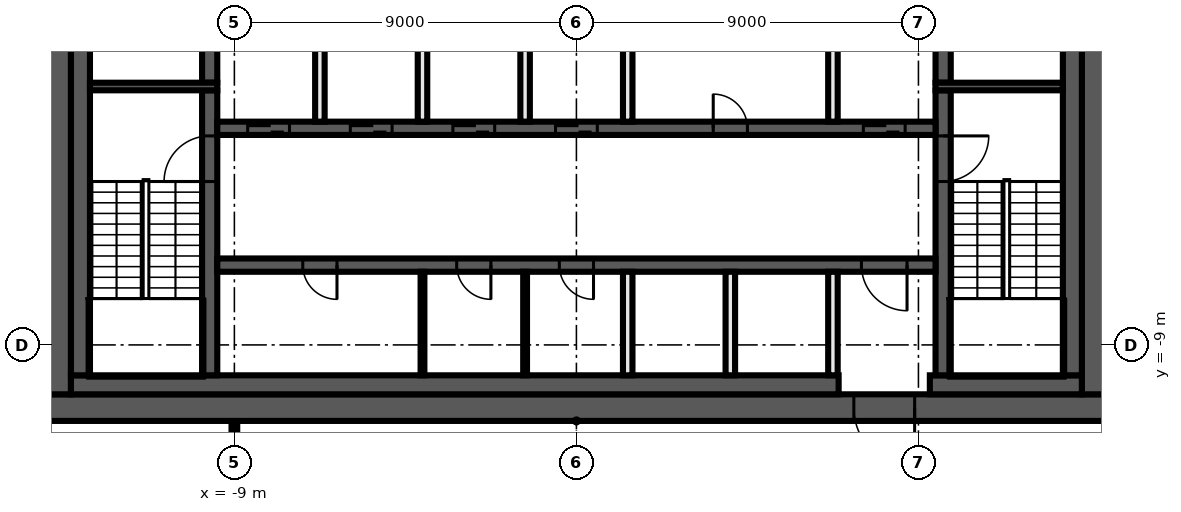
"""IFC4 building model, lengths in metres.
Left out: names, types, materials, properties, quantities, classifications, styles, units other than length and angle.
Written with IfcOpenShell. Run it as: python <this file> out.ifc"""

import sys

from ifc_helpers import new_model, si_unit, direction, frame, frame_2d, origin, place, context, subcontext, project, spatial, rectangle, extrude, element, fill, save


model = new_model("IFC4")
c1 = context("Model", 3, precision=1e-05, world=origin(), true_north=direction((0.0, 1.0)))
c2 = subcontext(c1, "Body", "Model", "MODEL_VIEW")
j1 = project(units=[si_unit("LENGTHUNIT", "METRE"), si_unit("PLANEANGLEUNIT", "RADIAN")], contexts=[c1])
p1 = place(None, origin())
s1 = spatial("IfcSite", under=j1, at=p1, CompositionType="ELEMENT")
p2 = place(p1, origin())
s2 = spatial("IfcBuilding", under=s1, at=p2, CompositionType="ELEMENT")
p3 = place(p2, frame((0.0, 0.0, 241.2)))
s3 = spatial("IfcBuildingStorey", under=s2, at=p3, CompositionType="ELEMENT", Elevation=241.2)
p4 = place(p3, frame((-9.0, -13.925, 0.0), z_axis=(0.0, 0.0, 1.0), x_axis=(0.0, 1.0, 0.0)))
e1 = element("IfcWall", 1, at=p4, inside=s3, PredefinedType="PARTITIONING", context=c2, shape_type="SweptSolid", body=[
    extrude(rectangle(XDim=2.925, YDim=0.15, at=frame_2d((1.462, 0.0))), origin(), (0.0, 0.0, 1.0), 3.82),
])
p5 = place(p3, frame((14.0, -10.65, 0.0), z_axis=(0.0, 0.0, 1.0), x_axis=(-1.0, 0.0, 0.0)))
e2 = element("IfcWall", 2, at=p5, inside=s3, PredefinedType="SHEAR", context=c2, shape_type="SweptSolid", body=[
    extrude(rectangle(XDim=28.0, YDim=0.7, at=frame_2d((14.0, 0.0))), origin(), (0.0, 0.0, 1.0), 3.82),
])
p6 = place(p5, frame((5.1, 0.0, 0.0)))
e3 = element("IfcOpeningElement", 3, at=p6, cuts=e2, PredefinedType="OPENING", context=c2, shape_type="SweptSolid", body=[
    extrude(rectangle(XDim=1.6, YDim=2.1, at=frame_2d((0.8, 1.05))), frame((0.0, 0.36, 0.0), z_axis=(0.0, -1.0, 0.0), x_axis=(1.0, 0.0, 0.0)), (0.0, 0.0, 1.0), 0.72),
])
for number, where, z_axis, x_axis in (
    (4, (13.65, 10.3, 0.0), (0.0, 0.0, 1.0), (0.0, -1.0, 0.0)),
    (5, (-13.65, -10.3, 0.0), (0.0, 0.0, 1.0), (0.0, 1.0, 0.0)),
):
    element("IfcWall", number, at=place(p3, frame(where, z_axis=z_axis, x_axis=x_axis)), inside=s3, PredefinedType="SHEAR", context=c2, shape_type="SweptSolid", body=[
        extrude(rectangle(XDim=20.6, YDim=0.7, at=frame_2d((10.3, 0.0))), origin(), (0.0, 0.0, 1.0), 3.82),
    ])
p7 = place(p3, frame((13.3, -10.05, 0.0), z_axis=(0.0, 0.0, 1.0), x_axis=(-1.0, 0.0, 0.0)))
e6 = element("IfcWall", 6, at=p7, inside=s3, PredefinedType="SHEAR", context=c2, shape_type="SweptSolid", body=[
    extrude(rectangle(XDim=4.0, YDim=0.5, at=frame_2d((2.0, 0.0))), origin(), (0.0, 0.0, 1.0), 3.82),
])
p8 = place(p3, frame((6.9, -10.05, 0.0), z_axis=(0.0, 0.0, 1.0), x_axis=(-1.0, 0.0, 0.0)))
e7 = element("IfcWall", 7, at=p8, inside=s3, PredefinedType="SHEAR", context=c2, shape_type="SweptSolid", body=[
    extrude(rectangle(XDim=20.2, YDim=0.5, at=frame_2d((10.1, 0.0))), origin(), (0.0, 0.0, 1.0), 3.82),
])
for number, where, z_axis, x_axis in (
    (8, (13.05, 9.8, 0.0), (0.0, 0.0, 1.0), (0.0, -1.0, 0.0)),
    (9, (-13.05, -9.8, 0.0), (0.0, 0.0, 1.0), (0.0, 1.0, 0.0)),
):
    element("IfcWall", number, at=place(p3, frame(where, z_axis=z_axis, x_axis=x_axis)), inside=s3, PredefinedType="SHEAR", context=c2, shape_type="SweptSolid", body=[
        extrude(rectangle(XDim=19.6, YDim=0.5, at=frame_2d((9.8, 0.0))), origin(), (0.0, 0.0, 1.0), 3.82),
    ])
p9 = place(p3, frame((9.65, -2.3, 0.0), z_axis=(0.0, 0.0, 1.0), x_axis=(0.0, -1.0, 0.0)))
e10 = element("IfcWall", 10, at=p9, inside=s3, PredefinedType="SHEAR", context=c2, shape_type="SweptSolid", body=[
    extrude(rectangle(XDim=7.5, YDim=0.4, at=frame_2d((3.75, 0.0))), origin(), (0.0, 0.0, 1.0), 3.82),
])
p10 = place(p9, frame((1.2, 0.0, 0.0)))
e11 = element("IfcOpeningElement", 11, at=p10, cuts=e10, PredefinedType="OPENING", context=c2, shape_type="SweptSolid", body=[
    extrude(rectangle(XDim=1.2, YDim=2.1, at=frame_2d((0.6, 1.05))), frame((0.0, 0.21, 0.0), z_axis=(0.0, -1.0, 0.0), x_axis=(1.0, 0.0, 0.0)), (0.0, 0.0, 1.0), 0.42),
])
p11 = place(p3, frame((9.65, 2.1, 0.0), z_axis=(0.0, 0.0, 1.0), x_axis=(0.0, -1.0, 0.0)))
e12 = element("IfcWall", 12, at=p11, inside=s3, PredefinedType="SHEAR", context=c2, shape_type="SweptSolid", body=[
    extrude(rectangle(XDim=4.2, YDim=0.4, at=frame_2d((2.1, 0.0))), origin(), (0.0, 0.0, 1.0), 3.82),
])
p12 = place(p11, frame((0.15, 0.0, 0.0)))
e13 = element("IfcOpeningElement", 13, at=p12, cuts=e12, PredefinedType="OPENING", context=c2, shape_type="SweptSolid", body=[
    extrude(rectangle(XDim=0.9, YDim=2.1, at=frame_2d((0.45, 1.05))), frame((0.0, 0.21, 0.0), z_axis=(0.0, -1.0, 0.0), x_axis=(1.0, 0.0, 0.0)), (0.0, 0.0, 1.0), 0.42),
])
p13 = place(p3, frame((-9.65, -9.8, 0.0), z_axis=(0.0, 0.0, 1.0), x_axis=(0.0, 1.0, 0.0)))
e14 = element("IfcWall", 14, at=p13, inside=s3, PredefinedType="SHEAR", context=c2, shape_type="SweptSolid", body=[
    extrude(rectangle(XDim=7.5, YDim=0.4, at=frame_2d((3.75, 0.0))), origin(), (0.0, 0.0, 1.0), 3.82),
])
p14 = place(p13, frame((5.1, 0.0, 0.0)))
e15 = element("IfcOpeningElement", 15, at=p14, cuts=e14, PredefinedType="OPENING", context=c2, shape_type="SweptSolid", body=[
    extrude(rectangle(XDim=1.2, YDim=2.1, at=frame_2d((0.6, 1.05))), frame((0.0, 0.21, 0.0), z_axis=(0.0, -1.0, 0.0), x_axis=(1.0, 0.0, 0.0)), (0.0, 0.0, 1.0), 0.42),
])
p15 = place(p3, frame((-9.65, -2.1, 0.0), z_axis=(0.0, 0.0, 1.0), x_axis=(0.0, 1.0, 0.0)))
e16 = element("IfcWall", 16, at=p15, inside=s3, PredefinedType="SHEAR", context=c2, shape_type="SweptSolid", body=[
    extrude(rectangle(XDim=4.2, YDim=0.4, at=frame_2d((2.1, 0.0))), origin(), (0.0, 0.0, 1.0), 3.82),
])
for number, where, z_axis, x_axis in (
    (17, (9.45, -2.2, 0.0), (0.0, 0.0, 1.0), (1.0, 0.0, 0.0)),
    (18, (-9.45, -2.2, 0.0), (0.0, 0.0, 1.0), (-1.0, 0.0, 0.0)),
):
    element("IfcWall", number, at=place(p3, frame(where, z_axis=z_axis, x_axis=x_axis)), inside=s3, PredefinedType="SHEAR", context=c2, shape_type="SweptSolid", body=[
        extrude(rectangle(XDim=3.35, YDim=0.2, at=frame_2d((1.675, 0.0))), origin(), (0.0, 0.0, 1.0), 3.82),
    ])
p16 = place(p3, frame((-9.45, -3.3, 0.0), z_axis=(0.0, 0.0, 1.0), x_axis=(1.0, 0.0, 0.0)))
e19 = element("IfcWall", 19, at=p16, inside=s3, PredefinedType="SHEAR", context=c2, shape_type="SweptSolid", body=[
    extrude(rectangle(XDim=18.9, YDim=0.35, at=frame_2d((9.45, 0.0))), origin(), (0.0, 0.0, 1.0), 3.82),
])
p17 = place(p16, frame((0.8, 0.0, 0.0)))
e20 = element("IfcOpeningElement", 20, at=p17, cuts=e19, PredefinedType="OPENING", context=c2, shape_type="SweptSolid", body=[
    extrude(rectangle(XDim=1.1, YDim=2.1, at=frame_2d((0.55, 1.05))), frame((0.0, 0.185, 0.0), z_axis=(0.0, -1.0, 0.0), x_axis=(1.0, 0.0, 0.0)), (0.0, 0.0, 1.0), 0.37),
])
p18 = place(p16, frame((3.5, 0.0, 0.0)))
e21 = element("IfcOpeningElement", 21, at=p18, cuts=e19, PredefinedType="OPENING", context=c2, shape_type="SweptSolid", body=[
    extrude(rectangle(XDim=1.1, YDim=2.1, at=frame_2d((0.55, 1.05))), frame((0.0, 0.185, 0.0), z_axis=(0.0, -1.0, 0.0), x_axis=(1.0, 0.0, 0.0)), (0.0, 0.0, 1.0), 0.37),
])
p19 = place(p16, frame((6.2, 0.0, 0.0)))
e22 = element("IfcOpeningElement", 22, at=p19, cuts=e19, PredefinedType="OPENING", context=c2, shape_type="SweptSolid", body=[
    extrude(rectangle(XDim=1.1, YDim=2.1, at=frame_2d((0.55, 1.05))), frame((0.0, 0.185, 0.0), z_axis=(0.0, -1.0, 0.0), x_axis=(1.0, 0.0, 0.0)), (0.0, 0.0, 1.0), 0.37),
])
p20 = place(p16, frame((8.9, 0.0, 0.0)))
e23 = element("IfcOpeningElement", 23, at=p20, cuts=e19, PredefinedType="OPENING", context=c2, shape_type="SweptSolid", body=[
    extrude(rectangle(XDim=1.1, YDim=2.1, at=frame_2d((0.55, 1.05))), frame((0.0, 0.185, 0.0), z_axis=(0.0, -1.0, 0.0), x_axis=(1.0, 0.0, 0.0)), (0.0, 0.0, 1.0), 0.37),
])
p21 = place(p16, frame((17.0, 0.0, 0.0)))
e24 = element("IfcOpeningElement", 24, at=p21, cuts=e19, PredefinedType="OPENING", context=c2, shape_type="SweptSolid", body=[
    extrude(rectangle(XDim=1.1, YDim=2.1, at=frame_2d((0.55, 1.05))), frame((0.0, 0.185, 0.0), z_axis=(0.0, -1.0, 0.0), x_axis=(1.0, 0.0, 0.0)), (0.0, 0.0, 1.0), 0.37),
])
p22 = place(p16, frame((13.05, 0.0, 0.0)))
e25 = element("IfcOpeningElement", 25, at=p22, cuts=e19, PredefinedType="OPENING", context=c2, shape_type="SweptSolid", body=[
    extrude(rectangle(XDim=0.9, YDim=2.1, at=frame_2d((0.45, 1.05))), frame((0.0, 0.185, 0.0), z_axis=(0.0, -1.0, 0.0), x_axis=(1.0, 0.0, 0.0)), (0.0, 0.0, 1.0), 0.37),
])
p23 = place(p3, frame((9.45, -6.9, 0.0), z_axis=(0.0, 0.0, 1.0), x_axis=(-1.0, 0.0, 0.0)))
e26 = element("IfcWall", 26, at=p23, inside=s3, PredefinedType="SHEAR", context=c2, shape_type="SweptSolid", body=[
    extrude(rectangle(XDim=18.9, YDim=0.35, at=frame_2d((9.45, 0.0))), origin(), (0.0, 0.0, 1.0), 3.82),
])
p24 = place(p23, frame((0.75, 0.0, 0.0)))
e27 = element("IfcOpeningElement", 27, at=p24, cuts=e26, PredefinedType="OPENING", context=c2, shape_type="SweptSolid", body=[
    extrude(rectangle(XDim=1.2, YDim=2.1, at=frame_2d((0.6, 1.05))), frame((0.0, 0.185, 0.0), z_axis=(0.0, -1.0, 0.0), x_axis=(1.0, 0.0, 0.0)), (0.0, 0.0, 1.0), 0.37),
])
p25 = place(p23, frame((15.75, 0.0, 0.0)))
e28 = element("IfcOpeningElement", 28, at=p25, cuts=e26, PredefinedType="OPENING", context=c2, shape_type="SweptSolid", body=[
    extrude(rectangle(XDim=0.9, YDim=2.1, at=frame_2d((0.45, 1.05))), frame((0.0, 0.185, 0.0), z_axis=(0.0, -1.0, 0.0), x_axis=(1.0, 0.0, 0.0)), (0.0, 0.0, 1.0), 0.37),
])
p26 = place(p23, frame((11.7, 0.0, 0.0)))
e29 = element("IfcOpeningElement", 29, at=p26, cuts=e26, PredefinedType="OPENING", context=c2, shape_type="SweptSolid", body=[
    extrude(rectangle(XDim=0.9, YDim=2.1, at=frame_2d((0.45, 1.05))), frame((0.0, 0.185, 0.0), z_axis=(0.0, -1.0, 0.0), x_axis=(1.0, 0.0, 0.0)), (0.0, 0.0, 1.0), 0.37),
])
p27 = place(p23, frame((9.0, 0.0, 0.0)))
e30 = element("IfcOpeningElement", 30, at=p27, cuts=e26, PredefinedType="OPENING", context=c2, shape_type="SweptSolid", body=[
    extrude(rectangle(XDim=0.9, YDim=2.1, at=frame_2d((0.45, 1.05))), frame((0.0, 0.185, 0.0), z_axis=(0.0, -1.0, 0.0), x_axis=(1.0, 0.0, 0.0)), (0.0, 0.0, 1.0), 0.37),
])
for number, where, z_axis, x_axis in (
    (31, (6.75, -9.8, 0.0), (0.0, 0.0, 1.0), (0.0, 1.0, 0.0)),
    (32, (6.75, -3.125, 0.0), (0.0, 0.0, 1.0), (0.0, 1.0, 0.0)),
    (33, (4.05, -9.8, 0.0), (0.0, 0.0, 1.0), (0.0, 1.0, 0.0)),
    (34, (1.35, -9.8, 0.0), (0.0, 0.0, 1.0), (0.0, 1.0, 0.0)),
    (35, (1.35, -3.125, 0.0), (0.0, 0.0, 1.0), (0.0, 1.0, 0.0)),
):
    element("IfcWall", number, at=place(p3, frame(where, z_axis=z_axis, x_axis=x_axis)), inside=s3, PredefinedType="SOLIDWALL", context=c2, shape_type="SweptSolid", body=[
        extrude(rectangle(XDim=2.725, YDim=0.25, at=frame_2d((1.363, 0.0))), origin(), (0.0, 0.0, 1.0), 3.82),
    ])
p28 = place(p3, frame((-1.35, -9.8, 0.0), z_axis=(0.0, 0.0, 1.0), x_axis=(0.0, 1.0, 0.0)))
e36 = element("IfcWall", 36, at=p28, inside=s3, PredefinedType="PARTITIONING", context=c2, shape_type="SweptSolid", body=[
    extrude(rectangle(XDim=2.725, YDim=0.1, at=frame_2d((1.363, 0.0))), origin(), (0.0, 0.0, 1.0), 3.82),
])
p29 = place(p3, frame((-1.35, -3.125, 0.0), z_axis=(0.0, 0.0, 1.0), x_axis=(0.0, 1.0, 0.0)))
e37 = element("IfcWall", 37, at=p29, inside=s3, PredefinedType="SOLIDWALL", context=c2, shape_type="SweptSolid", body=[
    extrude(rectangle(XDim=2.725, YDim=0.25, at=frame_2d((1.363, 0.0))), origin(), (0.0, 0.0, 1.0), 3.82),
])
p30 = place(p3, frame((-4.05, -9.8, 0.0), z_axis=(0.0, 0.0, 1.0), x_axis=(0.0, 1.0, 0.0)))
e38 = element("IfcWall", 38, at=p30, inside=s3, PredefinedType="PARTITIONING", context=c2, shape_type="SweptSolid", body=[
    extrude(rectangle(XDim=2.725, YDim=0.1, at=frame_2d((1.363, 0.0))), origin(), (0.0, 0.0, 1.0), 3.82),
])
for number, where, z_axis, x_axis in (
    (39, (-4.05, -3.125, 0.0), (0.0, 0.0, 1.0), (0.0, 1.0, 0.0)),
    (40, (-6.75, -3.125, 0.0), (0.0, 0.0, 1.0), (0.0, 1.0, 0.0)),
):
    element("IfcWall", number, at=place(p3, frame(where, z_axis=z_axis, x_axis=x_axis)), inside=s3, PredefinedType="SOLIDWALL", context=c2, shape_type="SweptSolid", body=[
        extrude(rectangle(XDim=2.725, YDim=0.25, at=frame_2d((1.363, 0.0))), origin(), (0.0, 0.0, 1.0), 3.82),
    ])
p31 = place(p17, origin())
e41 = element("IfcDoor", 41, at=p31, inside=s3, OperationType="DOUBLE_DOOR_SLIDING", PredefinedType="DOOR", context=c2, shape_type="SweptSolid", body=[
    extrude(rectangle(XDim=1.1, YDim=2.1, at=frame_2d((0.55, 1.05))), frame((0.0, 0.025, 0.0), z_axis=(0.0, -1.0, 0.0), x_axis=(1.0, 0.0, 0.0)), (0.0, 0.0, 1.0), 0.05),
])
fill(e20, e41)
p32 = place(p18, origin())
e42 = element("IfcDoor", 42, at=p32, inside=s3, OperationType="DOUBLE_DOOR_SLIDING", PredefinedType="DOOR", context=c2, shape_type="SweptSolid", body=[
    extrude(rectangle(XDim=1.1, YDim=2.1, at=frame_2d((0.55, 1.05))), frame((0.0, 0.025, 0.0), z_axis=(0.0, -1.0, 0.0), x_axis=(1.0, 0.0, 0.0)), (0.0, 0.0, 1.0), 0.05),
])
fill(e21, e42)
p33 = place(p19, origin())
e43 = element("IfcDoor", 43, at=p33, inside=s3, OperationType="DOUBLE_DOOR_SLIDING", PredefinedType="DOOR", context=c2, shape_type="SweptSolid", body=[
    extrude(rectangle(XDim=1.1, YDim=2.1, at=frame_2d((0.55, 1.05))), frame((0.0, 0.025, 0.0), z_axis=(0.0, -1.0, 0.0), x_axis=(1.0, 0.0, 0.0)), (0.0, 0.0, 1.0), 0.05),
])
fill(e22, e43)
p34 = place(p20, origin())
e44 = element("IfcDoor", 44, at=p34, inside=s3, OperationType="DOUBLE_DOOR_SLIDING", PredefinedType="DOOR", context=c2, shape_type="SweptSolid", body=[
    extrude(rectangle(XDim=1.1, YDim=2.1, at=frame_2d((0.55, 1.05))), frame((0.0, 0.025, 0.0), z_axis=(0.0, -1.0, 0.0), x_axis=(1.0, 0.0, 0.0)), (0.0, 0.0, 1.0), 0.05),
])
fill(e23, e44)
p35 = place(p21, origin())
e45 = element("IfcDoor", 45, at=p35, inside=s3, OperationType="DOUBLE_DOOR_SLIDING", PredefinedType="DOOR", context=c2, shape_type="SweptSolid", body=[
    extrude(rectangle(XDim=1.1, YDim=2.1, at=frame_2d((0.55, 1.05))), frame((0.0, 0.025, 0.0), z_axis=(0.0, -1.0, 0.0), x_axis=(1.0, 0.0, 0.0)), (0.0, 0.0, 1.0), 0.05),
])
fill(e24, e45)
p36 = place(p6, origin())
e46 = element("IfcDoor", 46, at=p36, inside=s3, OperationType="DOUBLE_DOOR_SINGLE_SWING", PredefinedType="DOOR", context=c2, shape_type="SweptSolid", body=[
    extrude(rectangle(XDim=1.6, YDim=2.1, at=frame_2d((0.8, 1.05))), frame((0.0, 0.025, 0.0), z_axis=(0.0, -1.0, 0.0), x_axis=(1.0, 0.0, 0.0)), (0.0, 0.0, 1.0), 0.05),
])
fill(e3, e46)
p37 = place(p24, origin())
e47 = element("IfcDoor", 47, at=p37, inside=s3, OperationType="SINGLE_SWING_LEFT", PredefinedType="DOOR", context=c2, shape_type="SweptSolid", body=[
    extrude(rectangle(XDim=1.2, YDim=2.1, at=frame_2d((0.6, 1.05))), frame((0.0, 0.025, 0.0), z_axis=(0.0, -1.0, 0.0), x_axis=(1.0, 0.0, 0.0)), (0.0, 0.0, 1.0), 0.05),
])
fill(e27, e47)
p38 = place(p22, origin())
e48 = element("IfcDoor", 48, at=p38, inside=s3, OperationType="SINGLE_SWING_RIGHT", PredefinedType="DOOR", context=c2, shape_type="SweptSolid", body=[
    extrude(rectangle(XDim=0.9, YDim=2.1, at=frame_2d((0.45, 1.05))), frame((0.0, 0.025, 0.0), z_axis=(0.0, -1.0, 0.0), x_axis=(1.0, 0.0, 0.0)), (0.0, 0.0, 1.0), 0.05),
])
fill(e25, e48)
p39 = place(p25, origin())
e49 = element("IfcDoor", 49, at=p39, inside=s3, OperationType="SINGLE_SWING_LEFT", PredefinedType="DOOR", context=c2, shape_type="SweptSolid", body=[
    extrude(rectangle(XDim=0.9, YDim=2.1, at=frame_2d((0.45, 1.05))), frame((0.0, 0.025, 0.0), z_axis=(0.0, -1.0, 0.0), x_axis=(1.0, 0.0, 0.0)), (0.0, 0.0, 1.0), 0.05),
])
fill(e28, e49)
p40 = place(p26, origin())
e50 = element("IfcDoor", 50, at=p40, inside=s3, OperationType="SINGLE_SWING_RIGHT", PredefinedType="DOOR", context=c2, shape_type="SweptSolid", body=[
    extrude(rectangle(XDim=0.9, YDim=2.1, at=frame_2d((0.45, 1.05))), frame((0.0, 0.025, 0.0), z_axis=(0.0, -1.0, 0.0), x_axis=(1.0, 0.0, 0.0)), (0.0, 0.0, 1.0), 0.05),
])
fill(e29, e50)
p41 = place(p27, origin())
e51 = element("IfcDoor", 51, at=p41, inside=s3, OperationType="SINGLE_SWING_LEFT", PredefinedType="DOOR", context=c2, shape_type="SweptSolid", body=[
    extrude(rectangle(XDim=0.9, YDim=2.1, at=frame_2d((0.45, 1.05))), frame((0.0, 0.025, 0.0), z_axis=(0.0, -1.0, 0.0), x_axis=(1.0, 0.0, 0.0)), (0.0, 0.0, 1.0), 0.05),
])
fill(e30, e51)
p42 = place(p10, origin())
e52 = element("IfcDoor", 52, at=p42, inside=s3, OperationType="SINGLE_SWING_RIGHT", PredefinedType="DOOR", context=c2, shape_type="SweptSolid", body=[
    extrude(rectangle(XDim=1.2, YDim=2.1, at=frame_2d((0.6, 1.05))), frame((0.0, 0.025, 0.0), z_axis=(0.0, -1.0, 0.0), x_axis=(1.0, 0.0, 0.0)), (0.0, 0.0, 1.0), 0.05),
])
fill(e11, e52)
p43 = place(p14, origin())
e53 = element("IfcDoor", 53, at=p43, inside=s3, OperationType="SINGLE_SWING_LEFT", PredefinedType="DOOR", context=c2, shape_type="SweptSolid", body=[
    extrude(rectangle(XDim=1.2, YDim=2.1, at=frame_2d((0.6, 1.05))), frame((0.0, 0.025, 0.0), z_axis=(0.0, -1.0, 0.0), x_axis=(1.0, 0.0, 0.0)), (0.0, 0.0, 1.0), 0.05),
])
fill(e15, e53)
save(model, sys.argv[1])
